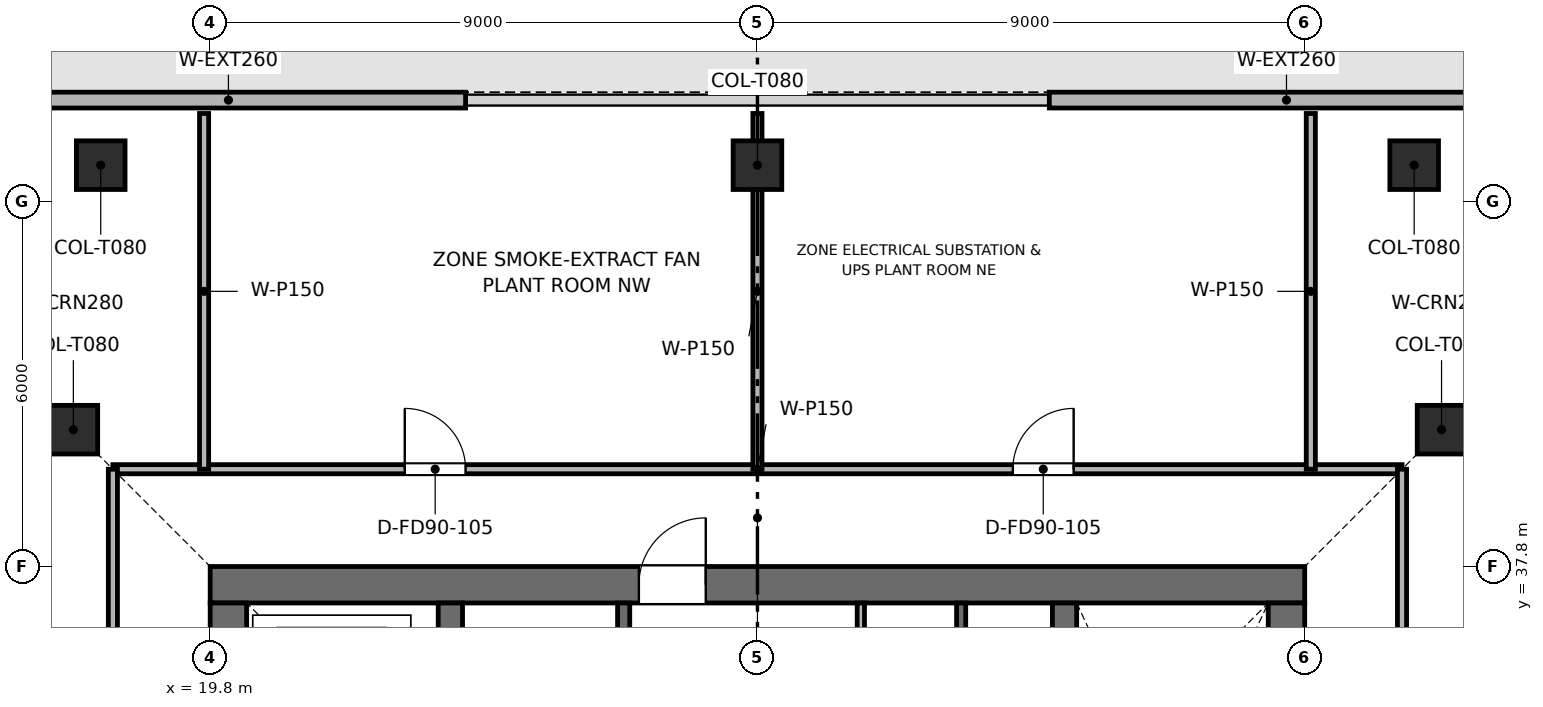
"""IFC4 building model, lengths in metres.
Left out: names, types, materials, properties, quantities, classifications, styles, units other than length and angle.
Written with IfcOpenShell. Run it as: python <this file> out.ifc"""

import sys

from ifc_helpers import new_model, si_unit, direction, frame, frame_2d, origin, origin_2d, place, context, subcontext, project, spatial, rectangle, extrude, element, fill, save


model = new_model("IFC4")
c1 = context("Model", 3, precision=1e-05, world=origin(), true_north=direction((0.0, 1.0)))
c2 = subcontext(c1, "Body", "Model", "MODEL_VIEW")
j1 = project(units=[si_unit("LENGTHUNIT", "METRE"), si_unit("PLANEANGLEUNIT", "RADIAN")], contexts=[c1])
p1 = place(None, origin())
s1 = spatial("IfcSite", under=j1, at=p1, CompositionType="ELEMENT")
p2 = place(p1, origin())
s2 = spatial("IfcBuilding", under=s1, at=p2, CompositionType="ELEMENT")
p3 = place(p2, frame((0.0, 0.0, 373.8)))
s3 = spatial("IfcBuildingStorey", under=s2, at=p3, CompositionType="ELEMENT", Elevation=373.8)
p4 = place(p3, frame((19.8, 37.5, 0.0), z_axis=(0.0, 0.0, 1.0), x_axis=(1.0, 0.0, 0.0)))
e1 = element("IfcWall", 1, at=p4, inside=s3, PredefinedType="SHEAR", context=c2, shape_type="SweptSolid", body=[
    extrude(rectangle(XDim=18.0, YDim=0.6, at=frame_2d((9.0, 0.0))), origin(), (0.0, 0.0, 1.0), 4.8),
])
p5 = place(p4, frame((7.05, 0.0, 0.0)))
e2 = element("IfcOpeningElement", 2, at=p5, cuts=e1, PredefinedType="OPENING", context=c2, shape_type="SweptSolid", body=[
    extrude(rectangle(XDim=1.1, YDim=2.15, at=frame_2d((0.55, 1.075))), frame((0.0, 0.31, 0.0), z_axis=(0.0, -1.0, 0.0), x_axis=(1.0, 0.0, 0.0)), (0.0, 0.0, 1.0), 0.62),
])
p6 = place(p3, frame((20.1, 20.4, 0.0), z_axis=(0.0, 0.0, 1.0), x_axis=(0.0, 1.0, 0.0)))
e3 = element("IfcWall", 3, at=p6, inside=s3, PredefinedType="SHEAR", context=c2, shape_type="SweptSolid", body=[
    extrude(rectangle(XDim=16.8, YDim=0.6, at=frame_2d((8.4, 0.0))), origin(), (0.0, 0.0, 1.0), 4.8),
])
p7 = place(p6, frame((10.4, 0.0, 0.0)))
e4 = element("IfcOpeningElement", 4, at=p7, cuts=e3, PredefinedType="OPENING", context=c2, shape_type="SweptSolid", body=[
    extrude(rectangle(XDim=1.1, YDim=2.15, at=frame_2d((0.55, 1.075))), frame((0.0, 0.31, 0.0), z_axis=(0.0, -1.0, 0.0), x_axis=(1.0, 0.0, 0.0)), (0.0, 0.0, 1.0), 0.62),
])
p8 = place(p3, frame((37.5, 20.4, 0.0), z_axis=(0.0, 0.0, 1.0), x_axis=(0.0, 1.0, 0.0)))
e5 = element("IfcWall", 5, at=p8, inside=s3, PredefinedType="SHEAR", context=c2, shape_type="SweptSolid", body=[
    extrude(rectangle(XDim=16.8, YDim=0.6, at=frame_2d((8.4, 0.0))), origin(), (0.0, 0.0, 1.0), 4.8),
])
p9 = place(p8, frame((4.9, 0.0, 0.0)))
e6 = element("IfcOpeningElement", 6, at=p9, cuts=e5, PredefinedType="OPENING", context=c2, shape_type="SweptSolid", body=[
    extrude(rectangle(XDim=1.1, YDim=2.15, at=frame_2d((0.55, 1.075))), frame((0.0, 0.31, 0.0), z_axis=(0.0, -1.0, 0.0), x_axis=(1.0, 0.0, 0.0)), (0.0, 0.0, 1.0), 0.62),
])
for number, where, z_axis, x_axis in (
    (7, (23.75, 20.4, 0.0), (0.0, 0.0, 1.0), (0.0, 1.0, 0.0)),
    (8, (33.85, 20.4, 0.0), (0.0, 0.0, 1.0), (0.0, 1.0, 0.0)),
):
    element("IfcWall", number, at=place(p3, frame(where, z_axis=z_axis, x_axis=x_axis)), inside=s3, PredefinedType="SHEAR", context=c2, shape_type="SweptSolid", body=[
        extrude(rectangle(XDim=16.8, YDim=0.4, at=frame_2d((8.4, 0.0))), origin(), (0.0, 0.0, 1.0), 4.8),
    ])
for number, where, z_axis, x_axis in (
    (9, (39.6, 44.4, 0.003), (0.0, 0.0, 1.0), (1.0, 0.0, 0.0)),
    (10, (28.8, 44.4, 0.003), (0.0, 0.0, 1.0), (1.0, 0.0, 0.0)),
    (11, (18.0, 44.4, 0.003), (0.0, 0.0, 1.0), (1.0, 0.0, 0.0)),
    (12, (40.05, 40.05, 0.003), (0.0, 0.0, 1.0), (1.0, 0.0, 0.0)),
    (13, (17.55, 40.05, 0.003), (0.0, 0.0, 1.0), (1.0, 0.0, 0.0)),
):
    element("IfcColumn", number, at=place(p3, frame(where, z_axis=z_axis, x_axis=x_axis)), inside=s3, PredefinedType="COLUMN", context=c2, shape_type="SweptSolid", body=[
        extrude(rectangle(XDim=0.8, YDim=0.8, at=origin_2d()), origin(), (0.0, 0.0, 1.0), 4.494),
    ])
p10 = place(p3, frame((16.2, 45.47, 0.0), z_axis=(0.0, 0.0, 1.0), x_axis=(1.0, 0.0, 0.0)))
e14 = element("IfcWall", 14, at=p10, inside=s3, PredefinedType="SOLIDWALL", context=c2, shape_type="SweptSolid", body=[
    extrude(rectangle(XDim=7.8, YDim=0.26, at=frame_2d((3.9, 0.0))), origin(), (0.0, 0.0, 1.0), 4.5),
])
p11 = place(p3, frame((33.6, 45.47, 0.0), z_axis=(0.0, 0.0, 1.0), x_axis=(1.0, 0.0, 0.0)))
e15 = element("IfcWall", 15, at=p11, inside=s3, PredefinedType="SOLIDWALL", context=c2, shape_type="SweptSolid", body=[
    extrude(rectangle(XDim=7.8, YDim=0.26, at=frame_2d((3.9, 0.0))), origin(), (0.0, 0.0, 1.0), 4.5),
])
p12 = place(p3, frame((32.15, 34.0, 0.0), z_axis=(0.0, 0.0, 1.0), x_axis=(0.0, 1.0, 0.0)))
e16 = element("IfcWall", 16, at=p12, inside=s3, PredefinedType="SHEAR", context=c2, shape_type="SweptSolid", body=[
    extrude(rectangle(XDim=3.2, YDim=0.15, at=frame_2d((1.6, 0.0))), origin(), (0.0, 0.0, 1.0), 4.5),
])
p13 = place(p3, frame((26.6, 34.0, 0.0), z_axis=(0.0, 0.0, 1.0), x_axis=(0.0, 1.0, 0.0)))
e17 = element("IfcWall", 17, at=p13, inside=s3, PredefinedType="SHEAR", context=c2, shape_type="SweptSolid", body=[
    extrude(rectangle(XDim=3.2, YDim=0.2, at=frame_2d((1.6, 0.0))), origin(), (0.0, 0.0, 1.0), 4.5),
])
p14 = place(p13, frame((0.75, 0.0, 0.0)))
e18 = element("IfcOpeningElement", 18, at=p14, cuts=e17, PredefinedType="OPENING", context=c2, shape_type="SweptSolid", body=[
    extrude(rectangle(XDim=1.1, YDim=2.15, at=frame_2d((0.55, 1.075))), frame((0.0, 0.11, 0.0), z_axis=(0.0, -1.0, 0.0), x_axis=(1.0, 0.0, 0.0)), (0.0, 0.0, 1.0), 0.22),
])
p15 = place(p3, frame((30.5, 33.925, 0.0), z_axis=(0.0, 0.0, 1.0), x_axis=(0.0, 1.0, 0.0)))
e19 = element("IfcWall", 19, at=p15, inside=s3, PredefinedType="PARTITIONING", context=c2, shape_type="SweptSolid", body=[
    extrude(rectangle(XDim=3.275, YDim=0.12, at=frame_2d((1.637, 0.0))), origin(), (0.0, 0.0, 1.0), 4.5),
])
p16 = place(p15, frame((0.85, 0.0, 0.0)))
e20 = element("IfcOpeningElement", 20, at=p16, cuts=e19, PredefinedType="OPENING", context=c2, shape_type="SweptSolid", body=[
    extrude(rectangle(XDim=0.9, YDim=2.1, at=frame_2d((0.45, 1.05))), frame((0.0, 0.07, 0.0), z_axis=(0.0, -1.0, 0.0), x_axis=(1.0, 0.0, 0.0)), (0.0, 0.0, 1.0), 0.14),
])
p17 = place(p3, frame((18.2, 39.4, 0.0), z_axis=(0.0, 0.0, 1.0), x_axis=(1.0, 0.0, 0.0)))
e21 = element("IfcWall", 21, at=p17, inside=s3, PredefinedType="PARTITIONING", context=c2, shape_type="SweptSolid", body=[
    extrude(rectangle(XDim=21.2, YDim=0.15, at=frame_2d((10.6, 0.0))), origin(), (0.0, 0.0, 1.0), 4.035),
])
p18 = place(p17, frame((4.8, 0.0, 0.0)))
e22 = element("IfcOpeningElement", 22, at=p18, cuts=e21, PredefinedType="OPENING", context=c2, shape_type="SweptSolid", body=[
    extrude(rectangle(XDim=1.0, YDim=2.15, at=frame_2d((0.5, 1.075))), frame((0.0, 0.085, 0.0), z_axis=(0.0, -1.0, 0.0), x_axis=(1.0, 0.0, 0.0)), (0.0, 0.0, 1.0), 0.17),
])
p19 = place(p17, frame((14.8, 0.0, 0.0)))
e23 = element("IfcOpeningElement", 23, at=p19, cuts=e21, PredefinedType="OPENING", context=c2, shape_type="SweptSolid", body=[
    extrude(rectangle(XDim=1.0, YDim=2.15, at=frame_2d((0.5, 1.075))), frame((0.0, 0.085, 0.0), z_axis=(0.0, -1.0, 0.0), x_axis=(1.0, 0.0, 0.0)), (0.0, 0.0, 1.0), 0.17),
])
for number, where, z_axis, x_axis in (
    (24, (18.2, 18.2, 0.0), (0.0, 0.0, 1.0), (0.0, 1.0, 0.0)),
    (25, (39.4, 18.2, 0.0), (0.0, 0.0, 1.0), (0.0, 1.0, 0.0)),
):
    element("IfcWall", number, at=place(p3, frame(where, z_axis=z_axis, x_axis=x_axis)), inside=s3, PredefinedType="PARTITIONING", context=c2, shape_type="SweptSolid", body=[
        extrude(rectangle(XDim=21.2, YDim=0.15, at=frame_2d((10.6, 0.0))), origin(), (0.0, 0.0, 1.0), 4.035),
    ])
p20 = place(p3, frame((19.7, 39.4, 0.0), z_axis=(0.0, 0.0, 1.0), x_axis=(0.0, 1.0, 0.0)))
e26 = element("IfcWall", 26, at=p20, inside=s3, PredefinedType="PARTITIONING", context=c2, shape_type="SweptSolid", body=[
    extrude(rectangle(XDim=5.85, YDim=0.15, at=frame_2d((2.925, 0.0))), origin(), (0.0, 0.0, 1.0), 4.185),
])
p21 = place(p3, frame((28.8, 39.4, 0.0), z_axis=(0.0, 0.0, 1.0), x_axis=(0.0, 1.0, 0.0)))
e27 = element("IfcWall", 27, at=p21, inside=s3, PredefinedType="PARTITIONING", context=c2, shape_type="SweptSolid", body=[
    extrude(rectangle(XDim=5.85, YDim=0.15, at=frame_2d((2.925, 0.0))), origin(), (0.0, 0.0, 1.0), 4.035),
])
p22 = place(p3, frame((37.9, 39.4, 0.0), z_axis=(0.0, 0.0, 1.0), x_axis=(0.0, 1.0, 0.0)))
e28 = element("IfcWall", 28, at=p22, inside=s3, PredefinedType="PARTITIONING", context=c2, shape_type="SweptSolid", body=[
    extrude(rectangle(XDim=5.85, YDim=0.15, at=frame_2d((2.925, 0.0))), origin(), (0.0, 0.0, 1.0), 4.185),
])
p23 = place(p18, origin())
e29 = element("IfcDoor", 29, at=p23, inside=s3, OperationType="SINGLE_SWING_LEFT", PredefinedType="DOOR", context=c2, shape_type="SweptSolid", body=[
    extrude(rectangle(XDim=1.0, YDim=2.15, at=frame_2d((0.5, 1.075))), frame((0.0, 0.025, 0.0), z_axis=(0.0, -1.0, 0.0), x_axis=(1.0, 0.0, 0.0)), (0.0, 0.0, 1.0), 0.05),
])
fill(e22, e29)
p24 = place(p19, origin())
e30 = element("IfcDoor", 30, at=p24, inside=s3, OperationType="SINGLE_SWING_RIGHT", PredefinedType="DOOR", context=c2, shape_type="SweptSolid", body=[
    extrude(rectangle(XDim=1.0, YDim=2.15, at=frame_2d((0.5, 1.075))), frame((0.0, 0.025, 0.0), z_axis=(0.0, -1.0, 0.0), x_axis=(1.0, 0.0, 0.0)), (0.0, 0.0, 1.0), 0.05),
])
fill(e23, e30)
p25 = place(p5, origin())
e31 = element("IfcDoor", 31, at=p25, inside=s3, OperationType="SINGLE_SWING_RIGHT", PredefinedType="DOOR", context=c2, shape_type="SweptSolid", body=[
    extrude(rectangle(XDim=1.1, YDim=2.15, at=frame_2d((0.55, 1.075))), frame((0.0, 0.025, 0.0), z_axis=(0.0, -1.0, 0.0), x_axis=(1.0, 0.0, 0.0)), (0.0, 0.0, 1.0), 0.05),
])
fill(e2, e31)
save(model, sys.argv[1])
